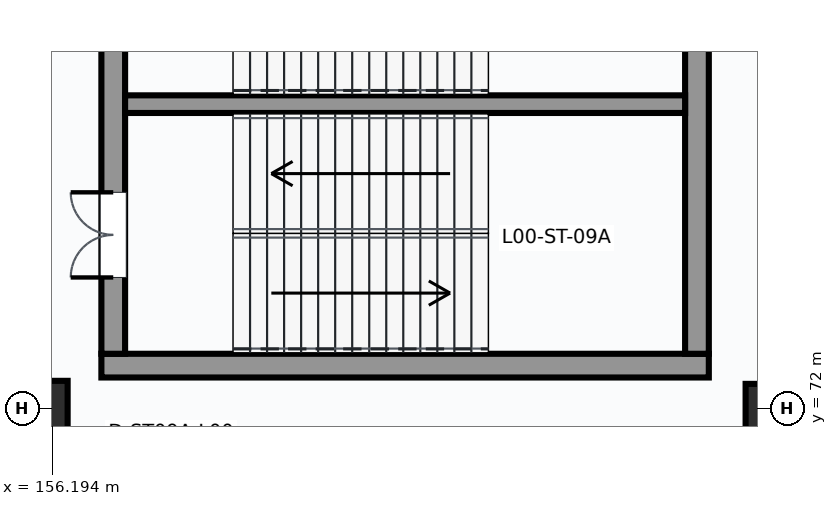
"""IFC4 building model, lengths in metres.
Left out: names, types, materials, properties, quantities, classifications, styles, units other than length and angle.
Written with IfcOpenShell. Run it as: python <this file> out.ifc"""

import sys

from ifc_helpers import new_model, si_unit, direction, frame, frame_2d, origin, origin_2d, place, context, subcontext, project, spatial, rectangle, circle, extrude, element, fill, save


model = new_model("IFC4")
c1 = context("Model", 3, precision=1e-05, world=origin(), true_north=direction((0.0, 1.0)))
c2 = subcontext(c1, "Body", "Model", "MODEL_VIEW")
j1 = project(units=[si_unit("LENGTHUNIT", "METRE"), si_unit("PLANEANGLEUNIT", "RADIAN")], contexts=[c1])
p1 = place(None, origin())
s1 = spatial("IfcSite", under=j1, at=p1, CompositionType="ELEMENT")
p2 = place(p1, origin())
s2 = spatial("IfcBuilding", under=s1, at=p2, CompositionType="ELEMENT")
p3 = place(p2, origin())
s3 = spatial("IfcBuildingStorey", under=s2, at=p3, CompositionType="ELEMENT", Elevation=0.0)
p4 = place(p3, frame((156.0, 72.0, 0.0), z_axis=(0.0, 0.0, 1.0), x_axis=(1.0, 0.0, 0.0)))
e1 = element("IfcColumn", 1, at=p4, inside=s3, PredefinedType="COLUMN", context=c2, shape_type="SweptSolid", body=[
    extrude(circle(Radius=0.45, at=origin_2d()), origin(), (0.0, 0.0, 1.0), 5.4),
])
p5 = place(p3, frame((168.0, 72.0, 0.0), z_axis=(0.0, 0.0, 1.0), x_axis=(1.0, 0.0, 0.0)))
e2 = element("IfcColumn", 2, at=p5, inside=s3, PredefinedType="COLUMN", context=c2, shape_type="SweptSolid", body=[
    extrude(rectangle(XDim=0.8, YDim=0.8, at=origin_2d()), origin(), (0.0, 0.0, 1.0), 5.4),
])
p6 = place(p3, frame((157.005, 72.7, 0.0), z_axis=(0.0, 0.0, 1.0), x_axis=(1.0, 0.0, 0.0)))
e3 = element("IfcWall", 3, at=p6, inside=s3, PredefinedType="SHEAR", context=c2, shape_type="SweptSolid", body=[
    extrude(rectangle(XDim=9.99, YDim=0.39, at=frame_2d((4.995, 0.0))), origin(), (0.0, 0.0, 1.0), 5.4),
])
p7 = place(p3, frame((157.2, 72.895, 0.0), z_axis=(0.0, 0.0, 1.0), x_axis=(0.0, 1.0, 0.0)))
e4 = element("IfcWall", 4, at=p7, inside=s3, PredefinedType="SHEAR", context=c2, shape_type="SweptSolid", body=[
    extrude(rectangle(XDim=8.21, YDim=0.39, at=frame_2d((4.105, 0.0))), origin(), (0.0, 0.0, 1.0), 5.4),
])
p8 = place(p7, frame((1.255, 0.0, 0.0)))
e5 = element("IfcOpeningElement", 5, at=p8, cuts=e4, PredefinedType="OPENING", context=c2, shape_type="SweptSolid", body=[
    extrude(rectangle(XDim=1.4, YDim=2.2, at=frame_2d((0.7, 1.1))), frame((0.0, 0.205, 0.0), z_axis=(0.0, -1.0, 0.0), x_axis=(1.0, 0.0, 0.0)), (0.0, 0.0, 1.0), 0.41),
])
p9 = place(p7, frame((5.595, 0.0, 0.0)))
e6 = element("IfcOpeningElement", 6, at=p9, cuts=e4, PredefinedType="OPENING", context=c2, shape_type="SweptSolid", body=[
    extrude(rectangle(XDim=1.32, YDim=2.2, at=frame_2d((0.66, 1.1))), frame((0.0, 0.205, 0.0), z_axis=(0.0, -1.0, 0.0), x_axis=(1.0, 0.0, 0.0)), (0.0, 0.0, 1.0), 0.41),
])
p10 = place(p3, frame((166.8, 72.895, 0.0), z_axis=(0.0, 0.0, 1.0), x_axis=(0.0, 1.0, 0.0)))
e7 = element("IfcWall", 7, at=p10, inside=s3, PredefinedType="SHEAR", context=c2, shape_type="SweptSolid", body=[
    extrude(rectangle(XDim=8.21, YDim=0.39, at=frame_2d((4.105, 0.0))), origin(), (0.0, 0.0, 1.0), 5.4),
])
p11 = place(p3, frame((157.395, 77.0, 0.0), z_axis=(0.0, 0.0, 1.0), x_axis=(1.0, 0.0, 0.0)))
e8 = element("IfcWall", 8, at=p11, inside=s3, PredefinedType="SHEAR", context=c2, shape_type="SweptSolid", body=[
    extrude(rectangle(XDim=9.21, YDim=0.29, at=frame_2d((4.605, 0.0))), origin(), (0.0, 0.0, 1.0), 5.4),
])
p12 = place(p8, origin())
e9 = element("IfcDoor", 9, at=p12, inside=s3, OperationType="DOUBLE_DOOR_SINGLE_SWING", PredefinedType="DOOR", context=c2, shape_type="SweptSolid", body=[
    extrude(rectangle(XDim=1.4, YDim=2.2, at=frame_2d((0.7, 1.1))), frame((0.0, 0.025, 0.0), z_axis=(0.0, -1.0, 0.0), x_axis=(1.0, 0.0, 0.0)), (0.0, 0.0, 1.0), 0.05),
])
fill(e5, e9)
save(model, sys.argv[1])
